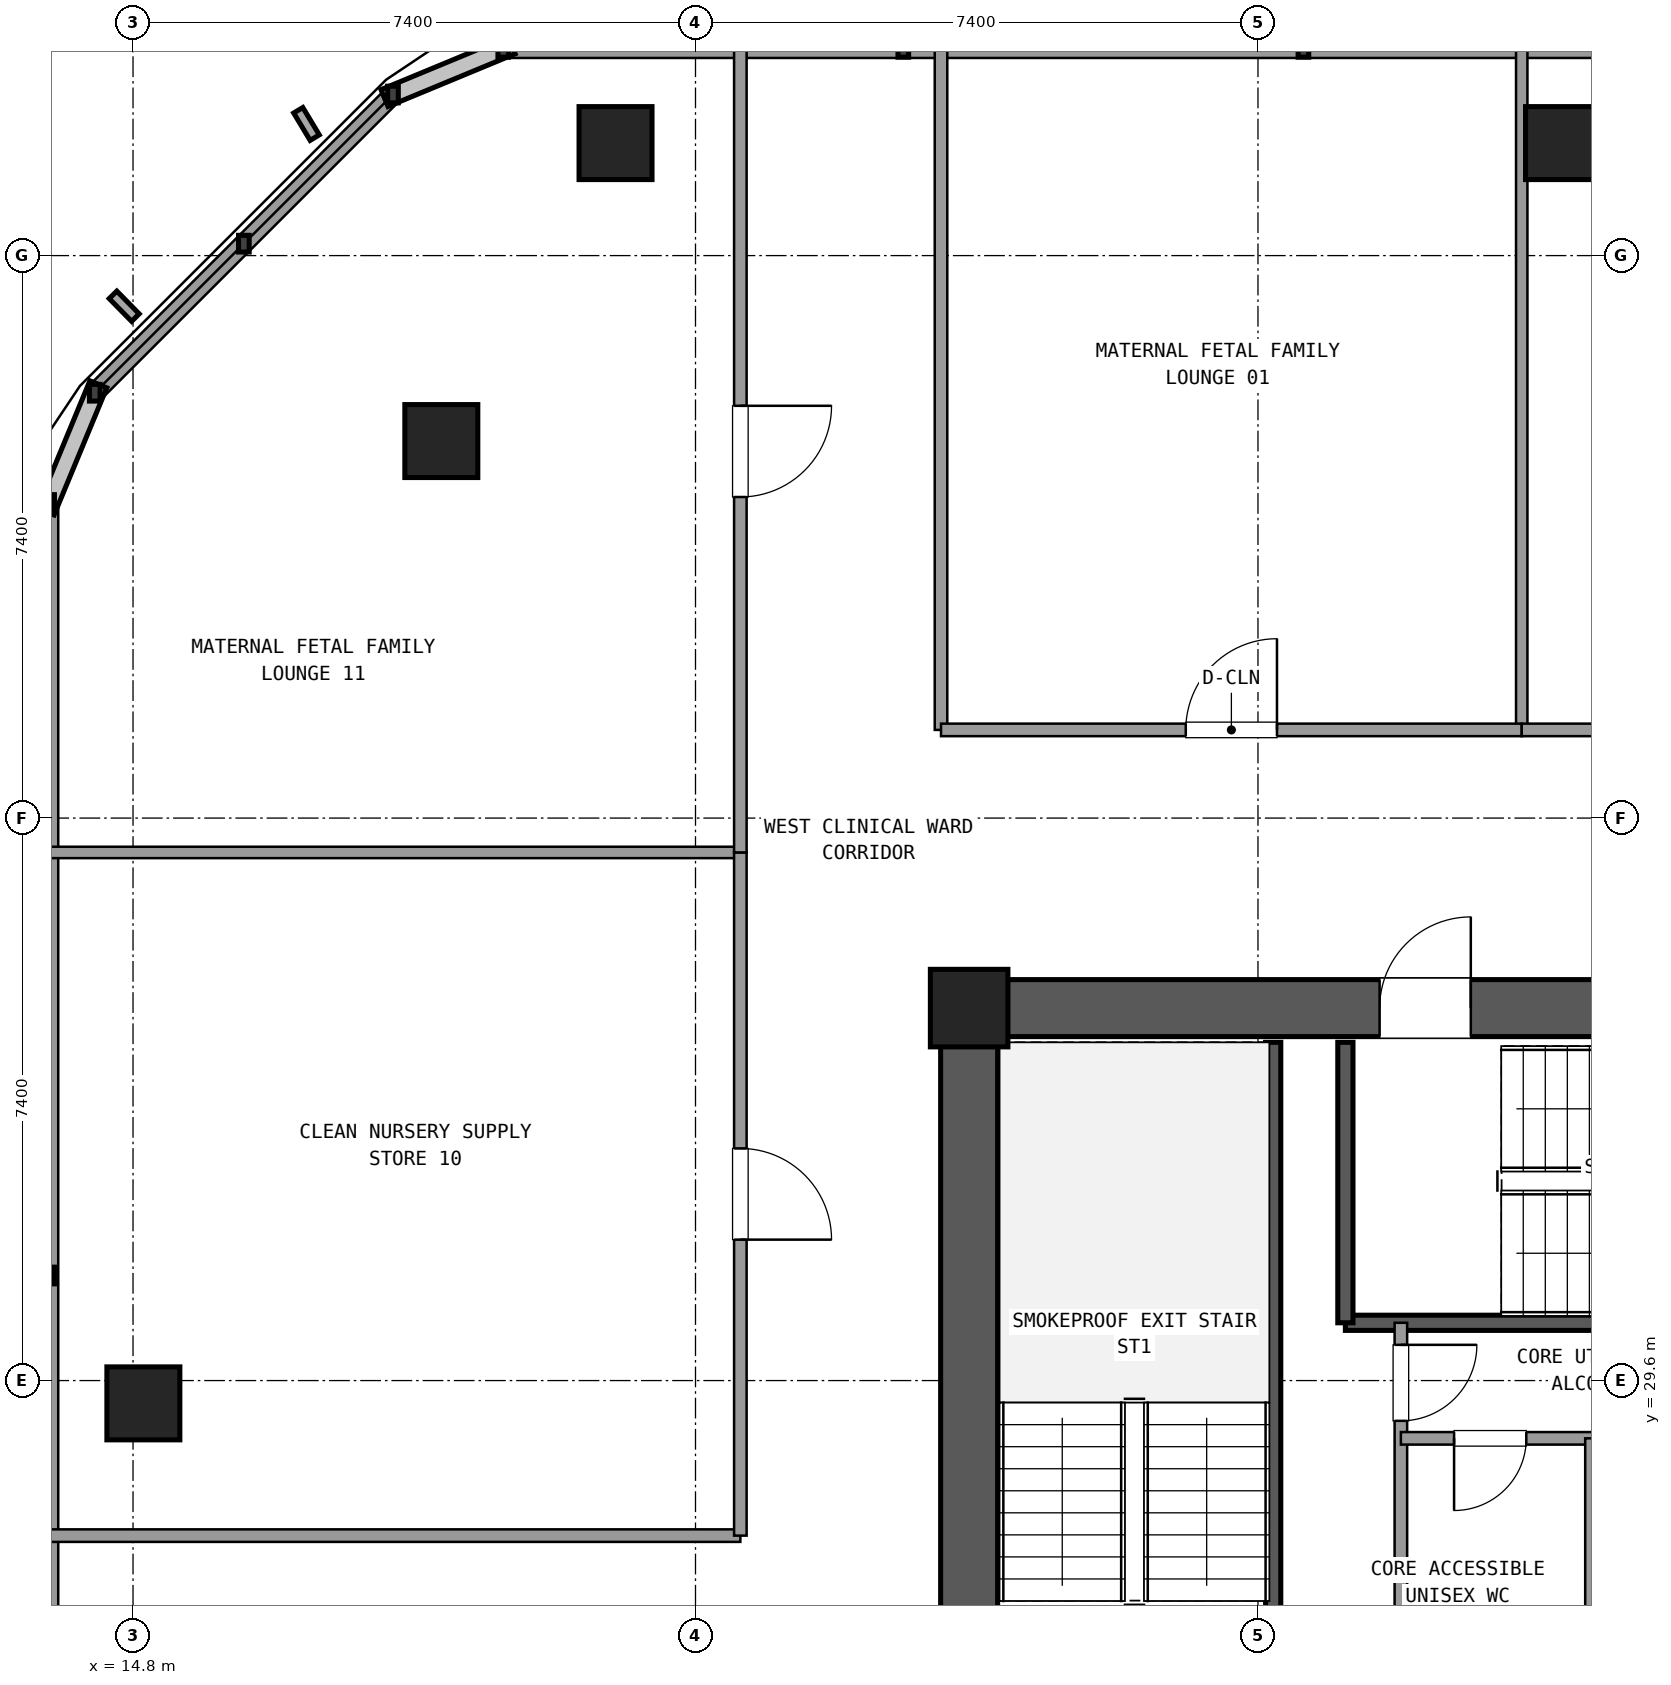
"""IFC4 building model, lengths in metres.
Left out: names, types, materials, properties, quantities, classifications, styles, units other than length and angle.
Written with IfcOpenShell. Run it as: python <this file> out.ifc"""

import sys

from ifc_helpers import new_model, si_unit, direction, frame, frame_2d, origin, origin_2d, place, context, subcontext, project, spatial, rectangle, extrude, element, fill, save


model = new_model("IFC4")
c1 = context("Model", 3, precision=1e-05, world=origin(), true_north=direction((0.0, 1.0)))
c2 = subcontext(c1, "Body", "Model", "MODEL_VIEW")
j1 = project(units=[si_unit("LENGTHUNIT", "METRE"), si_unit("PLANEANGLEUNIT", "RADIAN")], contexts=[c1])
p1 = place(None, origin())
s1 = spatial("IfcSite", under=j1, at=p1, CompositionType="ELEMENT")
p2 = place(p1, origin())
s2 = spatial("IfcBuilding", under=s1, at=p2, CompositionType="ELEMENT")
p3 = place(p2, frame((0.0, 0.0, 160.02)))
s3 = spatial("IfcBuildingStorey", under=s2, at=p3, CompositionType="ELEMENT", Elevation=160.02)
p4 = place(p3, frame((25.8, 34.5, 0.0), z_axis=(0.0, 0.0, 1.0), x_axis=(1.0, 0.0, 0.0)))
e1 = element("IfcColumn", 1, at=p4, inside=s3, PredefinedType="COLUMN", context=c2, shape_type="SweptSolid", body=[
    extrude(rectangle(XDim=1.02, YDim=1.02, at=origin_2d()), origin(), (0.0, 0.0, 1.0), 3.6),
])
p5 = place(p3, frame((36.495, 34.5, 0.0), z_axis=(0.0, 0.0, 1.0), x_axis=(-1.0, 0.0, 0.0)))
e2 = element("IfcWall", 2, at=p5, inside=s3, PredefinedType="SHEAR", context=c2, shape_type="SweptSolid", body=[
    extrude(rectangle(XDim=10.19, YDim=0.75, at=frame_2d((5.095, 0.0))), origin(), (0.0, 0.0, 1.0), 3.32),
])
p6 = place(p5, frame((4.095, 0.0, 0.0)))
e3 = element("IfcOpeningElement", 3, at=p6, cuts=e2, PredefinedType="OPENING", context=c2, shape_type="SweptSolid", body=[
    extrude(rectangle(XDim=1.2, YDim=2.15, at=frame_2d((0.6, 1.075))), frame((0.0, 0.385, 0.0), z_axis=(0.0, -1.0, 0.0), x_axis=(1.0, 0.0, 0.0)), (0.0, 0.0, 1.0), 0.77),
])
p7 = place(p3, frame((25.8, 33.995, 0.0), z_axis=(0.0, 0.0, 1.0), x_axis=(0.0, -1.0, 0.0)))
e4 = element("IfcWall", 4, at=p7, inside=s3, PredefinedType="SHEAR", context=c2, shape_type="SweptSolid", body=[
    extrude(rectangle(XDim=7.59, YDim=0.75, at=frame_2d((3.795, 0.0))), origin(), (0.0, 0.0, 1.0), 3.32),
])
for number, where, z_axis, x_axis in (
    (5, (33.6, 45.88, 0.0), (0.0, 0.0, 1.0), (1.0, 0.0, 0.0)),
    (6, (21.148, 45.88, 0.0), (0.0, 0.0, 1.0), (1.0, 0.0, 0.0)),
    (7, (18.856, 41.96, 0.0), (0.0, 0.0, 1.0), (1.0, 0.0, 0.0)),
    (8, (14.936, 29.3, 0.0), (0.0, 0.0, 1.0), (1.0, 0.0, 0.0)),
):
    element("IfcColumn", number, at=place(p3, frame(where, z_axis=z_axis, x_axis=x_axis)), inside=s3, PredefinedType="COLUMN", context=c2, shape_type="SweptSolid", body=[
        extrude(rectangle(XDim=0.96, YDim=0.96, at=origin_2d()), origin(), (0.0, 0.0, 1.0), 3.6),
    ])
p8 = place(p3, frame((35.461, 47.12, 0.0), z_axis=(0.0, 0.0, 1.0), x_axis=(-1.0, 0.0, 0.0)))
e9 = element("IfcWall", 9, at=p8, inside=s3, PredefinedType="SOLIDWALL", context=c2, shape_type="SweptSolid", body=[
    extrude(rectangle(XDim=15.79, YDim=0.24, at=frame_2d((7.895, 0.0))), origin(), (0.0, 0.0, 1.0), 0.85),
])
p9 = place(p3, frame((18.22, 46.519, 0.0), z_axis=(0.0, 0.0, 1.0), x_axis=(-0.707084777957, -0.707128783731, 0.0)))
e10 = element("IfcWall", 10, at=p9, inside=s3, PredefinedType="SOLIDWALL", context=c2, shape_type="SweptSolid", body=[
    extrude(rectangle(XDim=5.548, YDim=0.24, at=frame_2d((2.774, 0.0))), origin(), (0.0, 0.0, 1.0), 0.85),
])
p10 = place(p3, frame((13.696, 41.145, 0.0), z_axis=(0.0, 0.0, 1.0), x_axis=(0.0, -1.0, 0.0)))
e11 = element("IfcWall", 11, at=p10, inside=s3, PredefinedType="SOLIDWALL", context=c2, shape_type="SweptSolid", body=[
    extrude(rectangle(XDim=30.49, YDim=0.24, at=frame_2d((15.245, 0.0))), origin(), (0.0, 0.0, 1.0), 0.85),
])
p11 = place(p3, frame((29.8, 24.65, 0.0), z_axis=(0.0, 0.0, 1.0), x_axis=(0.0, 1.0, 0.0)))
e12 = element("IfcWall", 12, at=p11, inside=s3, PredefinedType="SHEAR", context=c2, shape_type="SweptSolid", body=[
    extrude(rectangle(XDim=9.4, YDim=0.2, at=frame_2d((4.7, 0.0))), origin(), (0.0, 0.0, 1.0), 3.32),
])
p12 = place(p3, frame((30.75, 30.36, 0.0), z_axis=(0.0, 0.0, 1.0), x_axis=(1.0, 0.0, 0.0)))
e13 = element("IfcWall", 13, at=p12, inside=s3, PredefinedType="SHEAR", context=c2, shape_type="SweptSolid", body=[
    extrude(rectangle(XDim=9.5, YDim=0.2, at=frame_2d((4.75, 0.0))), origin(), (0.0, 0.0, 1.0), 3.32),
])
p13 = place(p3, frame((30.75, 30.36, 0.0), z_axis=(0.0, 0.0, 1.0), x_axis=(0.0, 1.0, 0.0)))
e14 = element("IfcWall", 14, at=p13, inside=s3, PredefinedType="SHEAR", context=c2, shape_type="SweptSolid", body=[
    extrude(rectangle(XDim=3.69, YDim=0.2, at=frame_2d((1.845, 0.0))), origin(), (0.0, 0.0, 1.0), 3.32),
])
p14 = place(p3, frame((31.48, 26.32, 0.0), z_axis=(0.0, 0.0, 1.0), x_axis=(0.0, 1.0, 0.0)))
e15 = element("IfcWall", 15, at=p14, inside=s3, PredefinedType="PLUMBINGWALL", context=c2, shape_type="SweptSolid", body=[
    extrude(rectangle(XDim=4.04, YDim=0.165, at=frame_2d((2.02, 0.0))), origin(), (0.0, 0.0, 1.0), 2.61),
])
p15 = place(p14, frame((2.75, 0.0, 0.0)))
e16 = element("IfcOpeningElement", 16, at=p15, cuts=e15, PredefinedType="OPENING", context=c2, shape_type="SweptSolid", body=[
    extrude(rectangle(XDim=1.0, YDim=2.15, at=frame_2d((0.5, 1.075))), frame((0.0, 0.093, 0.0), z_axis=(0.0, -1.0, 0.0), x_axis=(1.0, 0.0, 0.0)), (0.0, 0.0, 1.0), 0.185),
])
p16 = place(p3, frame((31.48, 28.84, 0.0), z_axis=(0.0, 0.0, 1.0), x_axis=(1.0, 0.0, 0.0)))
e17 = element("IfcWall", 17, at=p16, inside=s3, PredefinedType="PLUMBINGWALL", context=c2, shape_type="SweptSolid", body=[
    extrude(rectangle(XDim=5.87, YDim=0.165, at=frame_2d((2.935, 0.0))), origin(), (0.0, 0.0, 1.0), 2.61),
])
p17 = place(p16, frame((0.7, 0.0, 0.0)))
e18 = element("IfcOpeningElement", 18, at=p17, cuts=e17, PredefinedType="OPENING", context=c2, shape_type="SweptSolid", body=[
    extrude(rectangle(XDim=0.95, YDim=2.1, at=frame_2d((0.475, 1.05))), frame((0.0, 0.093, 0.0), z_axis=(0.0, -1.0, 0.0), x_axis=(1.0, 0.0, 0.0)), (0.0, 0.0, 1.0), 0.185),
])
p18 = place(p16, frame((3.4, 0.0, 0.0)))
e19 = element("IfcOpeningElement", 19, at=p18, cuts=e17, PredefinedType="OPENING", context=c2, shape_type="SweptSolid", body=[
    extrude(rectangle(XDim=0.95, YDim=2.1, at=frame_2d((0.475, 1.05))), frame((0.0, 0.093, 0.0), z_axis=(0.0, -1.0, 0.0), x_axis=(1.0, 0.0, 0.0)), (0.0, 0.0, 1.0), 0.185),
])
p19 = place(p3, frame((33.98, 26.32, 0.0), z_axis=(0.0, 0.0, 1.0), x_axis=(0.0, 1.0, 0.0)))
e20 = element("IfcWall", 20, at=p19, inside=s3, PredefinedType="PARTITIONING", context=c2, shape_type="SweptSolid", body=[
    extrude(rectangle(XDim=2.52, YDim=0.15, at=frame_2d((1.26, 0.0))), origin(), (0.0, 0.0, 1.0), 2.61),
])
p20 = place(p3, frame((25.43, 38.16, 0.0), z_axis=(0.0, 0.0, 1.0), x_axis=(0.0, 1.0, 0.0)))
e21 = element("IfcWall", 21, at=p20, inside=s3, PredefinedType="PARTITIONING", context=c2, shape_type="SweptSolid", body=[
    extrude(rectangle(XDim=8.94, YDim=0.165, at=frame_2d((4.47, 0.0))), origin(), (0.0, 0.0, 1.0), 2.61),
])
p21 = place(p3, frame((13.716, 27.56, 0.0), z_axis=(0.0, 0.0, 1.0), x_axis=(1.0, 0.0, 0.0)))
e22 = element("IfcWall", 22, at=p21, inside=s3, PredefinedType="PARTITIONING", context=c2, shape_type="SweptSolid", body=[
    extrude(rectangle(XDim=9.074, YDim=0.165, at=frame_2d((4.537, 0.0))), origin(), (0.0, 0.0, 1.0), 2.61),
])
p22 = place(p3, frame((33.07, 38.16, 0.0), z_axis=(0.0, 0.0, 1.0), x_axis=(0.0, 1.0, 0.0)))
e23 = element("IfcWall", 23, at=p22, inside=s3, PredefinedType="PARTITIONING", context=c2, shape_type="SweptSolid", body=[
    extrude(rectangle(XDim=8.94, YDim=0.15, at=frame_2d((4.47, 0.0))), origin(), (0.0, 0.0, 1.0), 2.61),
])
p23 = place(p3, frame((25.43, 38.16, 0.0), z_axis=(0.0, 0.0, 1.0), x_axis=(1.0, 0.0, 0.0)))
e24 = element("IfcWall", 24, at=p23, inside=s3, PredefinedType="PARTITIONING", context=c2, shape_type="SweptSolid", body=[
    extrude(rectangle(XDim=7.64, YDim=0.165, at=frame_2d((3.82, 0.0))), origin(), (0.0, 0.0, 1.0), 2.61),
])
p24 = place(p23, frame((3.22, 0.0, 0.0)))
e25 = element("IfcOpeningElement", 25, at=p24, cuts=e24, PredefinedType="OPENING", context=c2, shape_type="SweptSolid", body=[
    extrude(rectangle(XDim=1.2, YDim=2.15, at=frame_2d((0.6, 1.075))), frame((0.0, 0.093, 0.0), z_axis=(0.0, -1.0, 0.0), x_axis=(1.0, 0.0, 0.0)), (0.0, 0.0, 1.0), 0.185),
])
p25 = place(p3, frame((33.07, 38.16, 0.0), z_axis=(0.0, 0.0, 1.0), x_axis=(1.0, 0.0, 0.0)))
e26 = element("IfcWall", 26, at=p25, inside=s3, PredefinedType="PARTITIONING", context=c2, shape_type="SweptSolid", body=[
    extrude(rectangle(XDim=7.629, YDim=0.165, at=frame_2d((3.814, 0.0))), origin(), (0.0, 0.0, 1.0), 2.61),
])
p26 = place(p25, frame((2.431, 0.0, 0.0)))
e27 = element("IfcOpeningElement", 27, at=p26, cuts=e26, PredefinedType="OPENING", context=c2, shape_type="SweptSolid", body=[
    extrude(rectangle(XDim=1.2, YDim=2.15, at=frame_2d((0.6, 1.075))), frame((0.0, 0.093, 0.0), z_axis=(0.0, -1.0, 0.0), x_axis=(1.0, 0.0, 0.0)), (0.0, 0.0, 1.0), 0.185),
])
p27 = place(p3, frame((22.79, 36.548, 0.0), z_axis=(0.0, 0.0, 1.0), x_axis=(-1.0, 0.0, 0.0)))
e28 = element("IfcWall", 28, at=p27, inside=s3, PredefinedType="PARTITIONING", context=c2, shape_type="SweptSolid", body=[
    extrude(rectangle(XDim=9.074, YDim=0.15, at=frame_2d((4.537, 0.0))), origin(), (0.0, 0.0, 1.0), 2.61),
])
p28 = place(p3, frame((22.79, 27.56, 0.0), z_axis=(0.0, 0.0, 1.0), x_axis=(0.0, 1.0, 0.0)))
e29 = element("IfcWall", 29, at=p28, inside=s3, PredefinedType="PARTITIONING", context=c2, shape_type="SweptSolid", body=[
    extrude(rectangle(XDim=8.988, YDim=0.165, at=frame_2d((4.494, 0.0))), origin(), (0.0, 0.0, 1.0), 2.61),
])
p29 = place(p28, frame((3.894, 0.0, 0.0)))
e30 = element("IfcOpeningElement", 30, at=p29, cuts=e29, PredefinedType="OPENING", context=c2, shape_type="SweptSolid", body=[
    extrude(rectangle(XDim=1.2, YDim=2.15, at=frame_2d((0.6, 1.075))), frame((0.0, 0.093, 0.0), z_axis=(0.0, -1.0, 0.0), x_axis=(1.0, 0.0, 0.0)), (0.0, 0.0, 1.0), 0.185),
])
p30 = place(p3, frame((22.79, 36.548, 0.0), z_axis=(0.0, 0.0, 1.0), x_axis=(0.0, 1.0, 0.0)))
e31 = element("IfcWall", 31, at=p30, inside=s3, PredefinedType="PARTITIONING", context=c2, shape_type="SweptSolid", body=[
    extrude(rectangle(XDim=10.552, YDim=0.165, at=frame_2d((5.276, 0.0))), origin(), (0.0, 0.0, 1.0), 2.61),
])
p31 = place(p30, frame((4.676, 0.0, 0.0)))
e32 = element("IfcOpeningElement", 32, at=p31, cuts=e31, PredefinedType="OPENING", context=c2, shape_type="SweptSolid", body=[
    extrude(rectangle(XDim=1.2, YDim=2.15, at=frame_2d((0.6, 1.075))), frame((0.0, 0.093, 0.0), z_axis=(0.0, -1.0, 0.0), x_axis=(1.0, 0.0, 0.0)), (0.0, 0.0, 1.0), 0.185),
])
p32 = place(p6, frame((1.2, 0.0, 0.0), z_axis=(0.0, 0.0, 1.0), x_axis=(-1.0, 0.0, 0.0)))
e33 = element("IfcDoor", 33, at=p32, inside=s3, OperationType="SINGLE_SWING_LEFT", PredefinedType="DOOR", context=c2, shape_type="SweptSolid", body=[
    extrude(rectangle(XDim=1.2, YDim=2.15, at=frame_2d((0.6, 1.075))), frame((0.0, 0.025, 0.0), z_axis=(0.0, -1.0, 0.0), x_axis=(1.0, 0.0, 0.0)), (0.0, 0.0, 1.0), 0.05),
])
fill(e3, e33)
p33 = place(p15, frame((1.0, 0.0, 0.0), z_axis=(0.0, 0.0, 1.0), x_axis=(-1.0, 0.0, 0.0)))
e34 = element("IfcDoor", 34, at=p33, inside=s3, OperationType="SINGLE_SWING_RIGHT", PredefinedType="DOOR", context=c2, shape_type="SweptSolid", body=[
    extrude(rectangle(XDim=1.0, YDim=2.15, at=frame_2d((0.5, 1.075))), frame((0.0, 0.025, 0.0), z_axis=(0.0, -1.0, 0.0), x_axis=(1.0, 0.0, 0.0)), (0.0, 0.0, 1.0), 0.05),
])
fill(e16, e34)
p34 = place(p17, frame((0.95, 0.0, 0.0), z_axis=(0.0, 0.0, 1.0), x_axis=(-1.0, 0.0, 0.0)))
e35 = element("IfcDoor", 35, at=p34, inside=s3, OperationType="SINGLE_SWING_LEFT", PredefinedType="DOOR", context=c2, shape_type="SweptSolid", body=[
    extrude(rectangle(XDim=0.95, YDim=2.1, at=frame_2d((0.475, 1.05))), frame((0.0, 0.025, 0.0), z_axis=(0.0, -1.0, 0.0), x_axis=(1.0, 0.0, 0.0)), (0.0, 0.0, 1.0), 0.05),
])
fill(e18, e35)
p35 = place(p24, origin())
e36 = element("IfcDoor", 36, at=p35, inside=s3, OperationType="SINGLE_SWING_RIGHT", PredefinedType="DOOR", context=c2, shape_type="SweptSolid", body=[
    extrude(rectangle(XDim=1.2, YDim=2.15, at=frame_2d((0.6, 1.075))), frame((0.0, 0.025, 0.0), z_axis=(0.0, -1.0, 0.0), x_axis=(1.0, 0.0, 0.0)), (0.0, 0.0, 1.0), 0.05),
])
fill(e25, e36)
p36 = place(p29, frame((1.2, 0.0, 0.0), z_axis=(0.0, 0.0, 1.0), x_axis=(-1.0, 0.0, 0.0)))
e37 = element("IfcDoor", 37, at=p36, inside=s3, OperationType="SINGLE_SWING_LEFT", PredefinedType="DOOR", context=c2, shape_type="SweptSolid", body=[
    extrude(rectangle(XDim=1.2, YDim=2.15, at=frame_2d((0.6, 1.075))), frame((0.0, 0.025, 0.0), z_axis=(0.0, -1.0, 0.0), x_axis=(1.0, 0.0, 0.0)), (0.0, 0.0, 1.0), 0.05),
])
fill(e30, e37)
p37 = place(p31, frame((1.2, 0.0, 0.0), z_axis=(0.0, 0.0, 1.0), x_axis=(-1.0, 0.0, 0.0)))
e38 = element("IfcDoor", 38, at=p37, inside=s3, OperationType="SINGLE_SWING_RIGHT", PredefinedType="DOOR", context=c2, shape_type="SweptSolid", body=[
    extrude(rectangle(XDim=1.2, YDim=2.15, at=frame_2d((0.6, 1.075))), frame((0.0, 0.025, 0.0), z_axis=(0.0, -1.0, 0.0), x_axis=(1.0, 0.0, 0.0)), (0.0, 0.0, 1.0), 0.05),
])
fill(e32, e38)
save(model, sys.argv[1])
